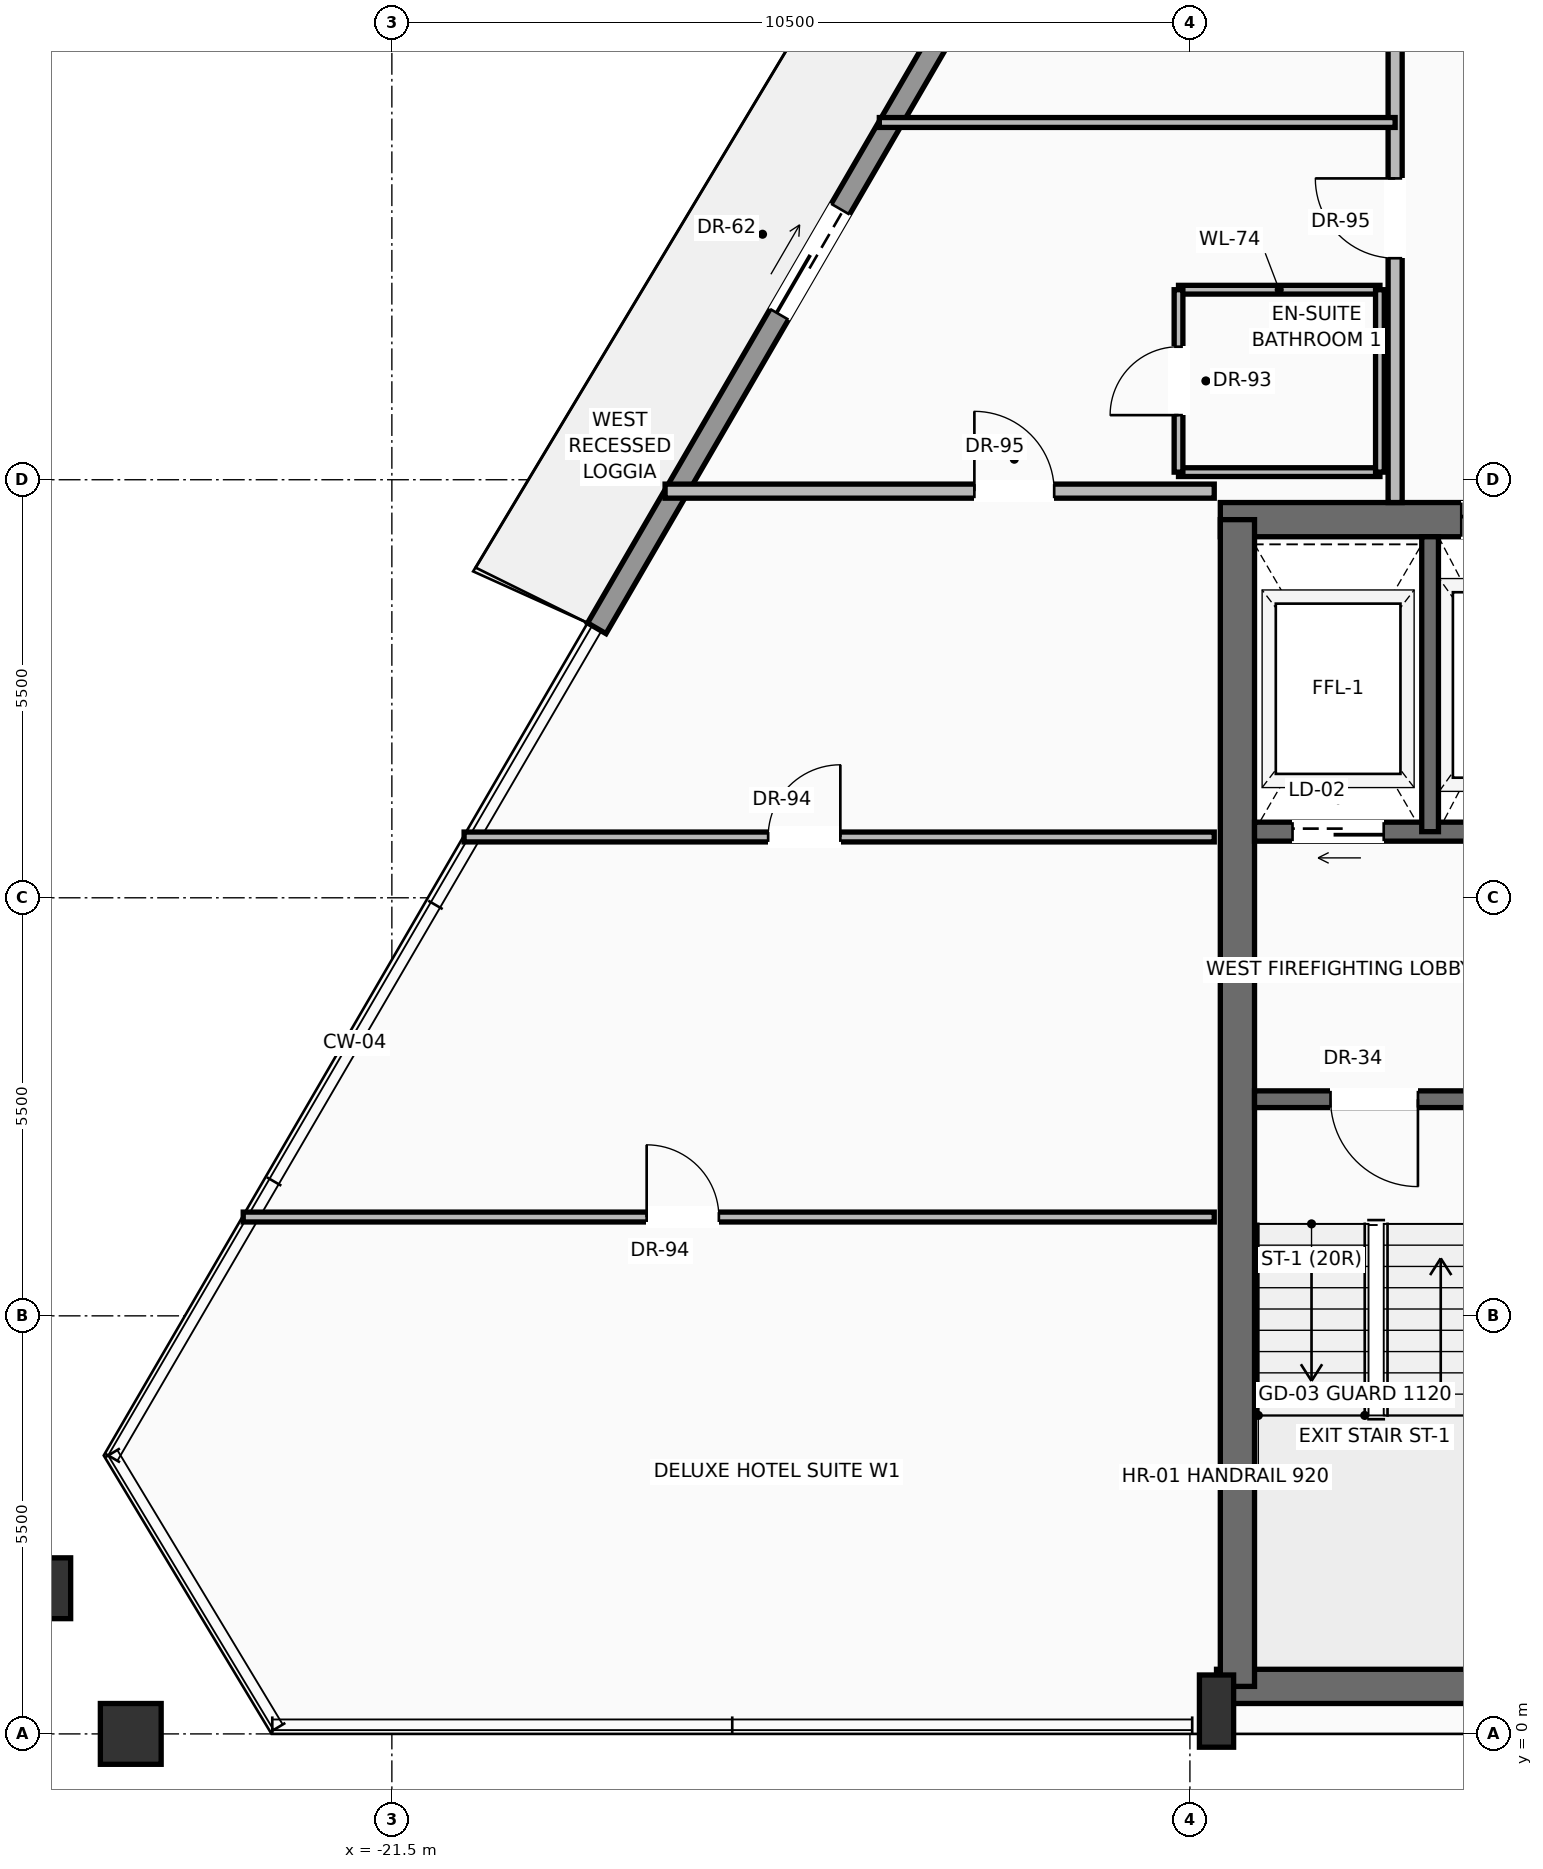
"""IFC4 building model, lengths in metres.
Left out: names, types, materials, properties, quantities, classifications, styles, units other than length and angle.
Written with IfcOpenShell. Run it as: python <this file> out.ifc"""

import sys

from ifc_helpers import new_model, si_unit, direction, frame, frame_2d, origin, origin_2d, place, context, subcontext, project, spatial, rectangle, hollow_rectangle, extrude, source, transform, mapped, element, fill, save


model = new_model("IFC4")
c1 = context("Model", 3, precision=1e-05, world=origin(), true_north=direction((0.0, 1.0)))
c2 = subcontext(c1, "Body", "Model", "MODEL_VIEW")
j1 = project(units=[si_unit("LENGTHUNIT", "METRE"), si_unit("PLANEANGLEUNIT", "RADIAN")], contexts=[c1])
p1 = place(None, origin())
s1 = spatial("IfcSite", under=j1, at=p1, CompositionType="ELEMENT")
p2 = place(p1, origin())
s2 = spatial("IfcBuilding", under=s1, at=p2, CompositionType="ELEMENT")
p3 = place(p2, frame((0.0, 0.0, 262.65)))
s3 = spatial("IfcBuildingStorey", under=s2, at=p3, CompositionType="ELEMENT", Elevation=262.65)
p4 = place(p3, frame((-10.65, 0.625, 0.0), z_axis=(0.0, 0.0, 1.0), x_axis=(1.0, 0.0, 0.0)))
e1 = element("IfcWall", 1, at=p4, inside=s3, PredefinedType="SHEAR", context=c2, shape_type="SweptSolid", body=[
    extrude(rectangle(XDim=21.3, YDim=0.45, at=frame_2d((10.65, 0.0))), origin(), (0.0, 0.0, 1.0), 3.24),
])
p5 = place(p3, frame((-10.6, 15.975, 0.0), z_axis=(0.0, 0.0, 1.0), x_axis=(1.0, 0.0, 0.0)))
e2 = element("IfcWall", 2, at=p5, inside=s3, PredefinedType="SHEAR", context=c2, shape_type="SweptSolid", body=[
    extrude(rectangle(XDim=21.2, YDim=0.45, at=frame_2d((10.6, 0.0))), origin(), (0.0, 0.0, 1.0), 3.24),
])
p6 = place(p5, frame((3.17, 0.0, 0.0)))
e3 = element("IfcOpeningElement", 3, at=p6, cuts=e2, PredefinedType="OPENING", context=c2, shape_type="SweptSolid", body=[
    extrude(rectangle(XDim=1.3, YDim=2.3, at=frame_2d((0.65, 1.15))), frame((0.0, 0.235, 0.0), z_axis=(0.0, -1.0, 0.0), x_axis=(1.0, 0.0, 0.0)), (0.0, 0.0, 1.0), 0.47),
])
p7 = place(p5, frame((9.6, 0.0, 0.0)))
e4 = element("IfcOpeningElement", 4, at=p7, cuts=e2, PredefinedType="OPENING", context=c2, shape_type="SweptSolid", body=[
    extrude(rectangle(XDim=2.0, YDim=2.4, at=frame_2d((1.0, 1.2))), frame((0.0, 0.235, 0.0), z_axis=(0.0, -1.0, 0.0), x_axis=(1.0, 0.0, 0.0)), (0.0, 0.0, 1.0), 0.47),
])
p8 = place(p3, frame((-10.375, 0.625, 0.0), z_axis=(0.0, 0.0, 1.0), x_axis=(0.0, 1.0, 0.0)))
e5 = element("IfcWall", 5, at=p8, inside=s3, PredefinedType="SHEAR", context=c2, shape_type="SweptSolid", body=[
    extrude(rectangle(XDim=15.35, YDim=0.45, at=frame_2d((7.675, 0.0))), origin(), (0.0, 0.0, 1.0), 3.24),
])
m1 = source(origin(), c2, "Body", "SweptSolid", [
    extrude(rectangle(XDim=0.45, YDim=0.95, at=origin_2d()), origin(), (0.0, 0.0, 1.0), 3.45),
])
p9 = place(p3, frame((-10.65, 0.3, 0.0), z_axis=(0.0, 0.0, 1.0), x_axis=(1.0, 0.0, 0.0)))
e6 = element("IfcColumn", 6, at=p9, inside=s3, PredefinedType="PILASTER", context=c2, shape_type="MappedRepresentation", body=[
    mapped(m1, transform((0.0, 0.0, 0.0), scale=1.0)),
])
m2 = source(origin(), c2, "Body", "SweptSolid", [
    extrude(hollow_rectangle(XDim=0.8, YDim=0.8, WallThickness=0.04, at=origin_2d()), origin(), (0.0, 0.0, 1.0), 3.441),
])
p10 = place(p3, frame((-24.935, 0.0, 0.004), z_axis=(-0.000354710534, 0.0, 0.99999993709), x_axis=(1.0, 0.0, 0.0)))
e7 = element("IfcColumn", 7, at=p10, inside=s3, PredefinedType="COLUMN", context=c2, shape_type="MappedRepresentation", body=[
    mapped(m2, transform((0.0, 0.0, 0.0), scale=1.0)),
])
m3 = source(origin(), c2, "Body", "SweptSolid", [
    extrude(hollow_rectangle(XDim=0.8, YDim=0.8, WallThickness=0.04, at=origin_2d()), origin(), (0.0, 0.0, 1.0), 3.442),
])
p11 = place(p3, frame((-26.126, 1.916, 0.004), z_axis=(0.011348416461, -0.016738914279, 0.999795490184), x_axis=(0.827708498205, 0.561158303868, 0.0)))
e8 = element("IfcColumn", 8, at=p11, inside=s3, PredefinedType="COLUMN", context=c2, shape_type="MappedRepresentation", body=[
    mapped(m3, transform((0.0, 0.0, 0.0), scale=1.0)),
])
p12 = place(p3, frame((-18.804, 14.545, 0.0), z_axis=(0.0, 0.0, 1.0), x_axis=(0.502487235879, 0.864584627309, 0.0)))
e9 = element("IfcWall", 9, at=p12, inside=s3, PredefinedType="SOLIDWALL", context=c2, shape_type="SweptSolid", body=[
    extrude(rectangle(XDim=19.908, YDim=0.28, at=frame_2d((9.954, 0.0))), origin(), (0.0, 0.0, 1.0), 2.82),
])
p13 = place(p12, frame((4.778, 0.0, 0.0)))
e10 = element("IfcOpeningElement", 10, at=p13, cuts=e9, PredefinedType="OPENING", context=c2, shape_type="SweptSolid", body=[
    extrude(rectangle(XDim=1.6, YDim=2.35, at=frame_2d((0.8, 1.175))), frame((0.0, 0.15, 0.0), z_axis=(0.0, -1.0, 0.0), x_axis=(1.0, 0.0, 0.0)), (0.0, 0.0, 1.0), 0.3),
])
p14 = place(p12, frame((13.538, 0.0, 0.9)))
e11 = element("IfcOpeningElement", 11, at=p14, cuts=e9, PredefinedType="OPENING", context=c2, shape_type="SweptSolid", body=[
    extrude(rectangle(XDim=2.0, YDim=1.75, at=frame_2d((1.0, 0.875))), frame((0.0, 0.15, 0.0), z_axis=(0.0, -1.0, 0.0), x_axis=(1.0, 0.0, 0.0)), (0.0, 0.0, 1.0), 0.3),
])
p15 = place(p3, frame((-5.5, 8.35, 0.0), z_axis=(0.0, 0.0, 1.0), x_axis=(-1.0, 0.0, 0.0)))
e12 = element("IfcWall", 12, at=p15, inside=s3, PredefinedType="SOLIDWALL", context=c2, shape_type="SweptSolid", body=[
    extrude(rectangle(XDim=4.65, YDim=0.22, at=frame_2d((2.325, 0.0))), origin(), (0.0, 0.0, 1.0), 3.24),
])
p16 = place(p15, frame((2.5, 0.0, 0.0)))
e13 = element("IfcOpeningElement", 13, at=p16, cuts=e12, PredefinedType="OPENING", context=c2, shape_type="SweptSolid", body=[
    extrude(rectangle(XDim=1.15, YDim=2.2, at=frame_2d((0.575, 1.1))), frame((0.0, 0.12, 0.0), z_axis=(0.0, -1.0, 0.0), x_axis=(1.0, 0.0, 0.0)), (0.0, 0.0, 1.0), 0.24),
])
p17 = place(p3, frame((-5.5, 11.87, 0.0), z_axis=(0.0, 0.0, 1.0), x_axis=(-1.0, 0.0, 0.0)))
e14 = element("IfcWall", 14, at=p17, inside=s3, PredefinedType="SOLIDWALL", context=c2, shape_type="SweptSolid", body=[
    extrude(rectangle(XDim=4.65, YDim=0.25, at=frame_2d((2.325, 0.0))), origin(), (0.0, 0.0, 1.0), 3.24),
])
p18 = place(p17, frame((2.95, 0.0, 0.0)))
e15 = element("IfcOpeningElement", 15, at=p18, cuts=e14, PredefinedType="OPENING", context=c2, shape_type="SweptSolid", body=[
    extrude(rectangle(XDim=1.2, YDim=2.25, at=frame_2d((0.6, 1.125))), frame((0.0, 0.135, 0.0), z_axis=(0.0, -1.0, 0.0), x_axis=(1.0, 0.0, 0.0)), (0.0, 0.0, 1.0), 0.27),
])
p19 = place(p3, frame((-7.84, 11.87, 0.0), z_axis=(0.0, 0.0, 1.0), x_axis=(0.0, 1.0, 0.0)))
e16 = element("IfcWall", 16, at=p19, inside=s3, PredefinedType="SOLIDWALL", context=c2, shape_type="SweptSolid", body=[
    extrude(rectangle(XDim=3.88, YDim=0.22, at=frame_2d((1.94, 0.0))), origin(), (0.0, 0.0, 1.0), 3.24),
])
p20 = place(p3, frame((-8.3, 16.2, 0.0), z_axis=(0.0, 0.0, 1.0), x_axis=(0.0, 1.0, 0.0)))
e17 = element("IfcWall", 17, at=p20, inside=s3, PredefinedType="PARTITIONING", context=c2, shape_type="SweptSolid", body=[
    extrude(rectangle(XDim=12.2, YDim=0.185, at=frame_2d((6.1, 0.0))), origin(), (0.0, 0.0, 1.0), 3.232),
])
p21 = place(p20, frame((3.214, 0.0, 0.0)))
e18 = element("IfcOpeningElement", 18, at=p21, cuts=e17, PredefinedType="OPENING", context=c2, shape_type="SweptSolid", body=[
    extrude(rectangle(XDim=1.05, YDim=2.25, at=frame_2d((0.525, 1.125))), frame((0.0, 0.103, 0.0), z_axis=(0.0, -1.0, 0.0), x_axis=(1.0, 0.0, 0.0)), (0.0, 0.0, 1.0), 0.205),
])
p22 = place(p20, frame((7.794, 0.0, 0.0)))
e19 = element("IfcOpeningElement", 19, at=p22, cuts=e17, PredefinedType="OPENING", context=c2, shape_type="SweptSolid", body=[
    extrude(rectangle(XDim=1.05, YDim=2.25, at=frame_2d((0.525, 1.125))), frame((0.0, 0.103, 0.0), z_axis=(0.0, -1.0, 0.0), x_axis=(1.0, 0.0, 0.0)), (0.0, 0.0, 1.0), 0.205),
])
p23 = place(p3, frame((-17.905, 16.35, 0.0), z_axis=(0.0, 0.0, 1.0), x_axis=(1.0, 0.0, 0.0)))
e20 = element("IfcWall", 20, at=p23, inside=s3, PredefinedType="PARTITIONING", context=c2, shape_type="SweptSolid", body=[
    extrude(rectangle(XDim=7.225, YDim=0.185, at=frame_2d((3.613, 0.0))), origin(), (0.0, 0.0, 1.0), 3.232),
])
p24 = place(p23, frame((4.069, 0.0, 0.0)))
e21 = element("IfcOpeningElement", 21, at=p24, cuts=e20, PredefinedType="OPENING", context=c2, shape_type="SweptSolid", body=[
    extrude(rectangle(XDim=1.05, YDim=2.25, at=frame_2d((0.525, 1.125))), frame((0.0, 0.103, 0.0), z_axis=(0.0, -1.0, 0.0), x_axis=(1.0, 0.0, 0.0)), (0.0, 0.0, 1.0), 0.205),
])
p25 = place(p3, frame((-23.456, 6.8, 0.0), z_axis=(0.0, 0.0, 1.0), x_axis=(1.0, 0.0, 0.0)))
e22 = element("IfcWall", 22, at=p25, inside=s3, PredefinedType="PARTITIONING", context=c2, shape_type="SweptSolid", body=[
    extrude(rectangle(XDim=12.776, YDim=0.13, at=frame_2d((6.388, 0.0))), origin(), (0.0, 0.0, 1.0), 3.232),
])
p26 = place(p25, frame((5.308, 0.0, 0.0)))
e23 = element("IfcOpeningElement", 23, at=p26, cuts=e22, PredefinedType="OPENING", context=c2, shape_type="SweptSolid", body=[
    extrude(rectangle(XDim=0.95, YDim=2.2, at=frame_2d((0.475, 1.1))), frame((0.0, 0.075, 0.0), z_axis=(0.0, -1.0, 0.0), x_axis=(1.0, 0.0, 0.0)), (0.0, 0.0, 1.0), 0.15),
])
p27 = place(p3, frame((-20.55, 11.8, 0.0), z_axis=(0.0, 0.0, 1.0), x_axis=(1.0, 0.0, 0.0)))
e24 = element("IfcWall", 24, at=p27, inside=s3, PredefinedType="PARTITIONING", context=c2, shape_type="SweptSolid", body=[
    extrude(rectangle(XDim=9.87, YDim=0.13, at=frame_2d((4.935, 0.0))), origin(), (0.0, 0.0, 1.0), 3.232),
])
p28 = place(p27, frame((4.0, 0.0, 0.0)))
e25 = element("IfcOpeningElement", 25, at=p28, cuts=e24, PredefinedType="OPENING", context=c2, shape_type="SweptSolid", body=[
    extrude(rectangle(XDim=0.95, YDim=2.2, at=frame_2d((0.475, 1.1))), frame((0.0, 0.075, 0.0), z_axis=(0.0, -1.0, 0.0), x_axis=(1.0, 0.0, 0.0)), (0.0, 0.0, 1.0), 0.15),
])
for number, where, z_axis, x_axis in (
    (26, (-11.15, 16.6, 0.0), (0.0, 0.0, 1.0), (1.0, 0.0, 0.0)),
    (27, (-11.15, 19.0, 0.0), (0.0, 0.0, 1.0), (1.0, 0.0, 0.0)),
):
    element("IfcWall", number, at=place(p3, frame(where, z_axis=z_axis, x_axis=x_axis)), inside=s3, PredefinedType="PARTITIONING", context=c2, shape_type="SweptSolid", body=[
        extrude(rectangle(XDim=2.65, YDim=0.115, at=frame_2d((1.325, 0.0))), origin(), (0.0, 0.0, 1.0), 3.232),
    ])
p29 = place(p3, frame((-11.15, 16.6, 0.0), z_axis=(0.0, 0.0, 1.0), x_axis=(0.0, 1.0, 0.0)))
e28 = element("IfcWall", 28, at=p29, inside=s3, PredefinedType="PARTITIONING", context=c2, shape_type="SweptSolid", body=[
    extrude(rectangle(XDim=2.4, YDim=0.115, at=frame_2d((1.2, 0.0))), origin(), (0.0, 0.0, 1.0), 3.232),
])
p30 = place(p29, frame((0.75, 0.0, 0.0)))
e29 = element("IfcOpeningElement", 29, at=p30, cuts=e28, PredefinedType="OPENING", context=c2, shape_type="SweptSolid", body=[
    extrude(rectangle(XDim=0.9, YDim=2.15, at=frame_2d((0.45, 1.075))), frame((0.0, 0.067, 0.0), z_axis=(0.0, -1.0, 0.0), x_axis=(1.0, 0.0, 0.0)), (0.0, 0.0, 1.0), 0.135),
])
p31 = place(p3, frame((-8.5, 16.6, 0.0), z_axis=(0.0, 0.0, 1.0), x_axis=(0.0, 1.0, 0.0)))
e30 = element("IfcWall", 30, at=p31, inside=s3, PredefinedType="PARTITIONING", context=c2, shape_type="SweptSolid", body=[
    extrude(rectangle(XDim=2.4, YDim=0.115, at=frame_2d((1.2, 0.0))), origin(), (0.0, 0.0, 1.0), 3.232),
])
p32 = place(p3, frame((-15.086, 21.2, 0.0), z_axis=(0.0, 0.0, 1.0), x_axis=(1.0, 0.0, 0.0)))
e31 = element("IfcWall", 31, at=p32, inside=s3, PredefinedType="PARTITIONING", context=c2, shape_type="SweptSolid", body=[
    extrude(rectangle(XDim=6.786, YDim=0.13, at=frame_2d((3.393, 0.0))), origin(), (0.0, 0.0, 1.0), 3.232),
])
m4 = source(origin(), c2, "Body", "SweptSolid", [
    extrude(rectangle(XDim=1.6, YDim=2.35, at=frame_2d((0.8, 1.175))), frame((0.0, 0.025, 0.0), z_axis=(0.0, -1.0, 0.0), x_axis=(1.0, 0.0, 0.0)), (0.0, 0.0, 1.0), 0.05),
])
p33 = place(p13, origin())
e32 = element("IfcDoor", 32, at=p33, inside=s3, OperationType="SLIDING_TO_LEFT", PredefinedType="DOOR", context=c2, shape_type="MappedRepresentation", body=[
    mapped(m4, transform((0.0, 0.0, 0.0), scale=1.0)),
])
fill(e10, e32)
m5 = source(origin(), c2, "Body", "SweptSolid", [
    extrude(rectangle(XDim=1.15, YDim=2.2, at=frame_2d((0.575, 1.1))), frame((0.0, 0.025, 0.0), z_axis=(0.0, -1.0, 0.0), x_axis=(1.0, 0.0, 0.0)), (0.0, 0.0, 1.0), 0.05),
])
p34 = place(p16, origin())
e33 = element("IfcDoor", 33, at=p34, inside=s3, OperationType="SINGLE_SWING_LEFT", PredefinedType="DOOR", context=c2, shape_type="MappedRepresentation", body=[
    mapped(m5, transform((0.0, 0.0, 0.0), scale=1.0)),
])
fill(e13, e33)
m6 = source(origin(), c2, "Body", "SweptSolid", [
    extrude(rectangle(XDim=1.2, YDim=2.25, at=frame_2d((0.6, 1.125))), frame((0.0, 0.025, 0.0), z_axis=(0.0, -1.0, 0.0), x_axis=(1.0, 0.0, 0.0)), (0.0, 0.0, 1.0), 0.05),
])
p35 = place(p18, origin())
e34 = element("IfcDoor", 34, at=p35, inside=s3, OperationType="SLIDING_TO_LEFT", PredefinedType="DOOR", context=c2, shape_type="MappedRepresentation", body=[
    mapped(m6, transform((0.0, 0.0, 0.0), scale=1.0)),
])
fill(e15, e34)
m7 = source(origin(), c2, "Body", "SweptSolid", [
    extrude(rectangle(XDim=1.3, YDim=2.3, at=frame_2d((0.65, 1.15))), frame((0.0, 0.025, 0.0), z_axis=(0.0, -1.0, 0.0), x_axis=(1.0, 0.0, 0.0)), (0.0, 0.0, 1.0), 0.05),
])
p36 = place(p6, origin())
e35 = element("IfcDoor", 35, at=p36, inside=s3, OperationType="SLIDING_TO_RIGHT", PredefinedType="DOOR", context=c2, shape_type="MappedRepresentation", body=[
    mapped(m7, transform((0.0, 0.0, 0.0), scale=1.0)),
])
fill(e3, e35)
m8 = source(origin(), c2, "Body", "SweptSolid", [
    extrude(rectangle(XDim=1.05, YDim=2.25, at=frame_2d((0.525, 1.125))), frame((0.0, 0.025, 0.0), z_axis=(0.0, -1.0, 0.0), x_axis=(1.0, 0.0, 0.0)), (0.0, 0.0, 1.0), 0.05),
])
p37 = place(p24, origin())
e36 = element("IfcDoor", 36, at=p37, inside=s3, OperationType="SINGLE_SWING_LEFT", PredefinedType="DOOR", context=c2, shape_type="MappedRepresentation", body=[
    mapped(m8, transform((0.0, 0.0, 0.0), scale=1.0)),
])
fill(e21, e36)
m9 = source(origin(), c2, "Body", "SweptSolid", [
    extrude(rectangle(XDim=0.95, YDim=2.2, at=frame_2d((0.475, 1.1))), frame((0.0, 0.025, 0.0), z_axis=(0.0, -1.0, 0.0), x_axis=(1.0, 0.0, 0.0)), (0.0, 0.0, 1.0), 0.05),
])
p38 = place(p26, origin())
e37 = element("IfcDoor", 37, at=p38, inside=s3, OperationType="SINGLE_SWING_LEFT", PredefinedType="DOOR", context=c2, shape_type="MappedRepresentation", body=[
    mapped(m9, transform((0.0, 0.0, 0.0), scale=1.0)),
])
fill(e23, e37)
p39 = place(p28, origin())
e38 = element("IfcDoor", 38, at=p39, inside=s3, OperationType="SINGLE_SWING_RIGHT", PredefinedType="DOOR", context=c2, shape_type="MappedRepresentation", body=[
    mapped(m9, transform((0.0, 0.0, 0.0), scale=1.0)),
])
fill(e25, e38)
p40 = place(p21, origin())
e39 = element("IfcDoor", 39, at=p40, inside=s3, OperationType="SINGLE_SWING_RIGHT", PredefinedType="DOOR", context=c2, shape_type="MappedRepresentation", body=[
    mapped(m8, transform((0.0, 0.0, 0.0), scale=1.0)),
])
fill(e18, e39)
m10 = source(origin(), c2, "Body", "SweptSolid", [
    extrude(rectangle(XDim=0.9, YDim=2.15, at=frame_2d((0.45, 1.075))), frame((0.0, 0.025, 0.0), z_axis=(0.0, -1.0, 0.0), x_axis=(1.0, 0.0, 0.0)), (0.0, 0.0, 1.0), 0.05),
])
p41 = place(p30, origin())
e40 = element("IfcDoor", 40, at=p41, inside=s3, OperationType="SINGLE_SWING_LEFT", PredefinedType="DOOR", context=c2, shape_type="MappedRepresentation", body=[
    mapped(m10, transform((0.0, 0.0, 0.0), scale=1.0)),
])
fill(e29, e40)
save(model, sys.argv[1])
